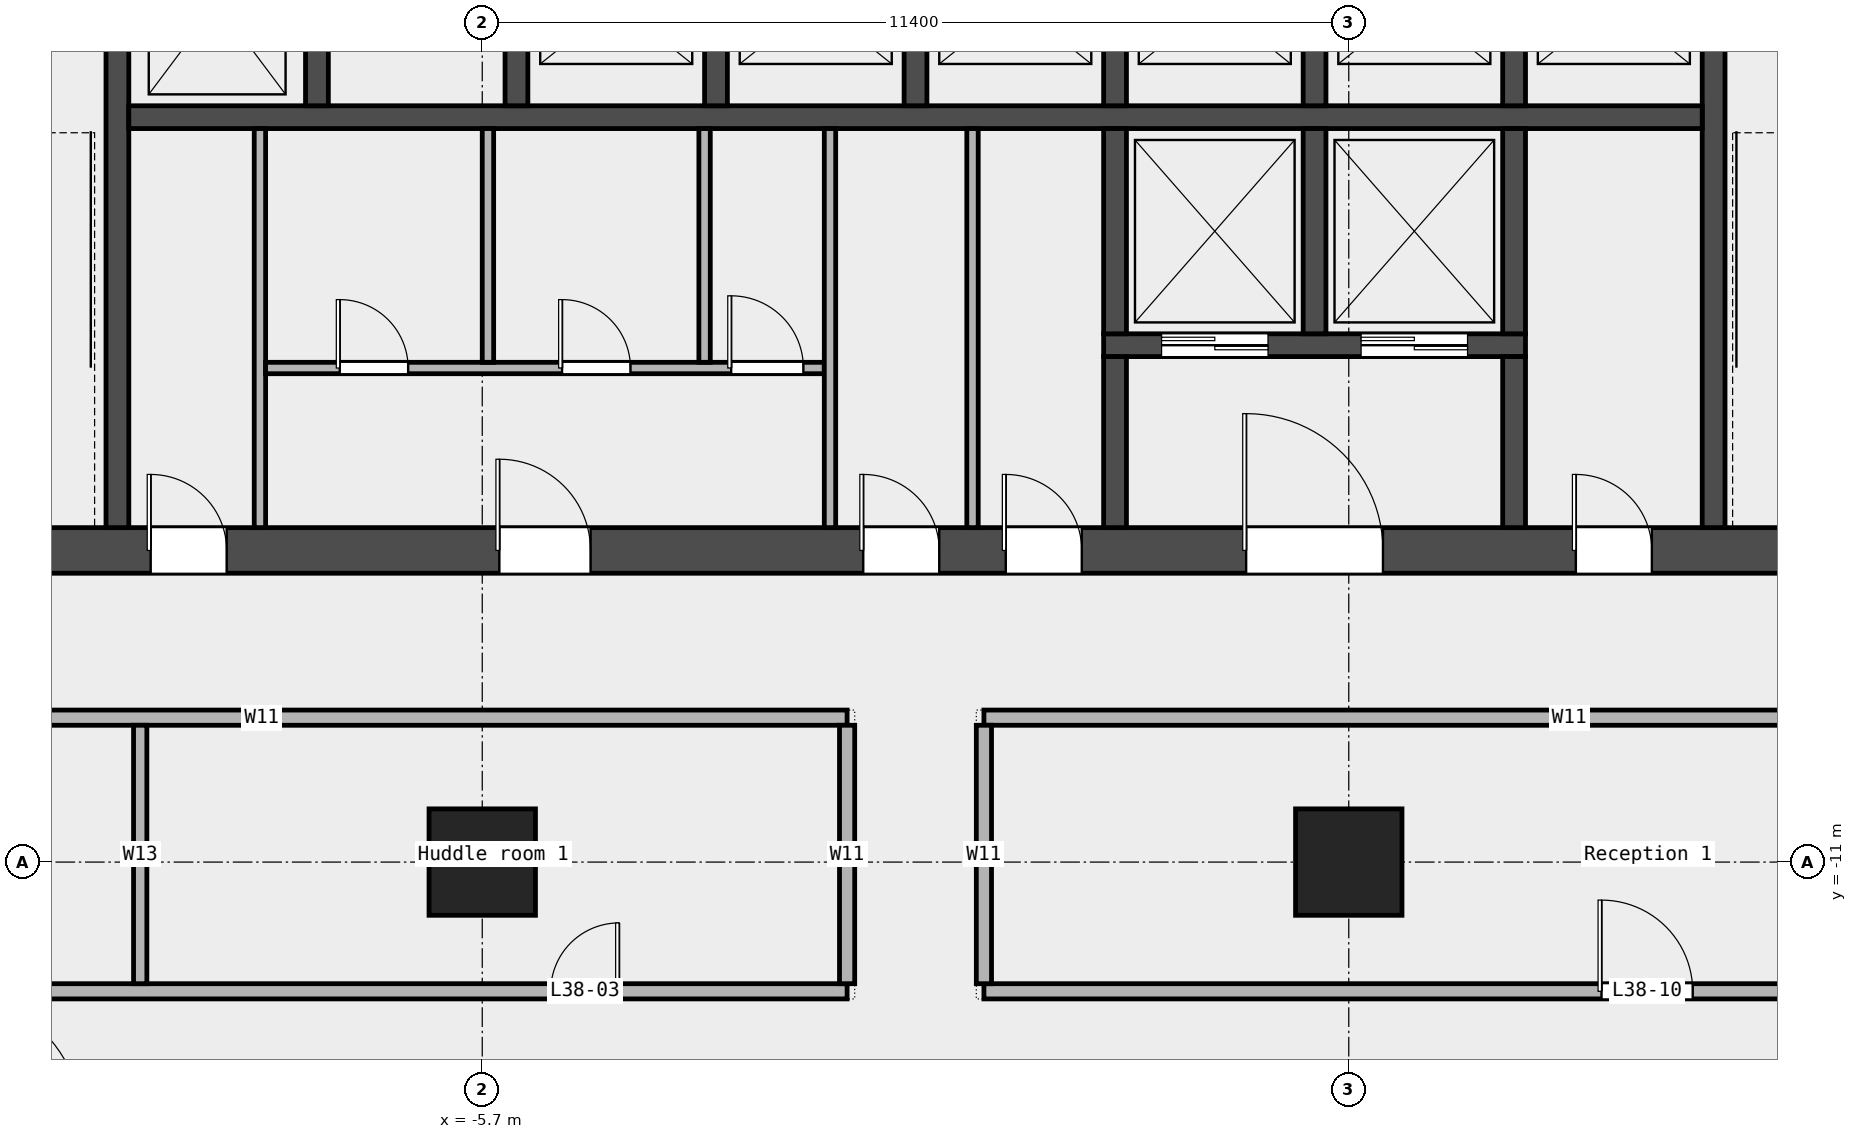
"""IFC4 building model, lengths in metres.
Left out: names, types, materials, properties, quantities, classifications, styles, units other than length and angle.
Written with IfcOpenShell. Run it as: python <this file> out.ifc"""

import sys

from ifc_helpers import new_model, si_unit, direction, frame, frame_2d, origin, origin_2d, place, context, subcontext, project, spatial, rectangle, extrude, element, fill, save


model = new_model("IFC4")
c1 = context("Model", 3, precision=1e-05, world=origin(), true_north=direction((0.0, 1.0)))
c2 = subcontext(c1, "Body", "Model", "MODEL_VIEW")
j1 = project(units=[si_unit("LENGTHUNIT", "METRE"), si_unit("PLANEANGLEUNIT", "RADIAN")], contexts=[c1])
p1 = place(None, origin())
s1 = spatial("IfcSite", under=j1, at=p1, CompositionType="ELEMENT")
p2 = place(p1, origin())
s2 = spatial("IfcBuilding", under=s1, at=p2, CompositionType="ELEMENT")
p3 = place(p2, frame((0.0, 0.0, 185.0)))
s3 = spatial("IfcBuildingStorey", under=s2, at=p3, CompositionType="ELEMENT", Elevation=185.0)
for number, where, z_axis, x_axis in (
    (1, (-5.7, -11.0, 0.0), (0.0, 0.0, 1.0), (1.0, 0.0, 0.0)),
    (2, (5.7, -11.0, 0.0), (0.0, 0.0, 1.0), (1.0, 0.0, 0.0)),
):
    element("IfcColumn", number, at=place(p3, frame(where, z_axis=z_axis, x_axis=x_axis)), inside=s3, PredefinedType="COLUMN", context=c2, shape_type="SweptSolid", body=[
        extrude(rectangle(XDim=1.4, YDim=1.4, at=origin_2d()), origin(), (0.0, 0.0, 1.0), 3.6),
    ])
p4 = place(p3, frame((-24.15, -12.7, 0.0), z_axis=(0.0, 0.0, 1.0), x_axis=(1.0, 0.0, 0.0)))
e3 = element("IfcWall", 3, at=p4, inside=s3, PredefinedType="PARTITIONING", context=c2, shape_type="SweptSolid", body=[
    extrude(rectangle(XDim=23.25, YDim=0.2, at=frame_2d((11.625, 0.0))), origin(), (0.0, 0.0, 1.0), 3.6),
])
p5 = place(p4, frame((19.35, 0.0, 0.0)))
e4 = element("IfcOpeningElement", 4, at=p5, cuts=e3, PredefinedType="OPENING", context=c2, shape_type="SweptSolid", body=[
    extrude(rectangle(XDim=0.9, YDim=2.1, at=frame_2d((0.45, 1.05))), frame((0.0, 0.112, 0.0), z_axis=(0.0, -1.0, 0.0), x_axis=(1.0, 0.0, 0.0)), (0.0, 0.0, 1.0), 0.224),
])
p6 = place(p4, frame((7.825, 0.0, 0.0)))
e5 = element("IfcOpeningElement", 5, at=p6, cuts=e3, PredefinedType="OPENING", context=c2, shape_type="SweptSolid", body=[
    extrude(rectangle(XDim=1.5, YDim=2.1, at=frame_2d((0.75, 1.05))), frame((0.0, 0.112, 0.0), z_axis=(0.0, -1.0, 0.0), x_axis=(1.0, 0.0, 0.0)), (0.0, 0.0, 1.0), 0.224),
])
p7 = place(p3, frame((0.9, -12.7, 0.0), z_axis=(0.0, 0.0, 1.0), x_axis=(1.0, 0.0, 0.0)))
e6 = element("IfcWall", 6, at=p7, inside=s3, PredefinedType="PARTITIONING", context=c2, shape_type="SweptSolid", body=[
    extrude(rectangle(XDim=25.25, YDim=0.2, at=frame_2d((12.625, 0.0))), origin(), (0.0, 0.0, 1.0), 3.6),
])
p8 = place(p7, frame((20.75, 0.0, 0.0)))
e7 = element("IfcOpeningElement", 7, at=p8, cuts=e6, PredefinedType="OPENING", context=c2, shape_type="SweptSolid", body=[
    extrude(rectangle(XDim=1.0, YDim=2.1, at=frame_2d((0.5, 1.05))), frame((0.0, 0.112, 0.0), z_axis=(0.0, -1.0, 0.0), x_axis=(1.0, 0.0, 0.0)), (0.0, 0.0, 1.0), 0.224),
])
p9 = place(p7, frame((8.125, 0.0, 0.0)))
e8 = element("IfcOpeningElement", 8, at=p9, cuts=e6, PredefinedType="OPENING", context=c2, shape_type="SweptSolid", body=[
    extrude(rectangle(XDim=1.2, YDim=2.1, at=frame_2d((0.6, 1.05))), frame((0.0, 0.112, 0.0), z_axis=(0.0, -1.0, 0.0), x_axis=(1.0, 0.0, 0.0)), (0.0, 0.0, 1.0), 0.224),
])
for number, where, z_axis, x_axis in (
    (9, (-16.3, -9.1, 0.0), (0.0, 0.0, 1.0), (1.0, 0.0, 0.0)),
    (10, (0.9, -9.1, 0.0), (0.0, 0.0, 1.0), (1.0, 0.0, 0.0)),
):
    element("IfcWall", number, at=place(p3, frame(where, z_axis=z_axis, x_axis=x_axis)), inside=s3, PredefinedType="PARTITIONING", context=c2, shape_type="SweptSolid", body=[
        extrude(rectangle(XDim=15.4, YDim=0.2, at=frame_2d((7.7, 0.0))), origin(), (0.0, 0.0, 1.0), 3.6),
    ])
p10 = place(p3, frame((-10.2, -12.6, 0.0), z_axis=(0.0, 0.0, 1.0), x_axis=(0.0, 1.0, 0.0)))
e11 = element("IfcWall", 11, at=p10, inside=s3, PredefinedType="PARTITIONING", context=c2, shape_type="SweptSolid", body=[
    extrude(rectangle(XDim=3.4, YDim=0.175, at=frame_2d((1.7, 0.0))), origin(), (0.0, 0.0, 1.0), 3.6),
])
for number, where, z_axis, x_axis in (
    (12, (-0.9, -12.6, 0.0), (0.0, 0.0, 1.0), (0.0, 1.0, 0.0)),
    (13, (0.9, -12.6, 0.0), (0.0, 0.0, 1.0), (0.0, 1.0, 0.0)),
):
    element("IfcWall", number, at=place(p3, frame(where, z_axis=z_axis, x_axis=x_axis)), inside=s3, PredefinedType="PARTITIONING", context=c2, shape_type="SweptSolid", body=[
        extrude(rectangle(XDim=3.4, YDim=0.2, at=frame_2d((1.7, 0.0))), origin(), (0.0, 0.0, 1.0), 3.6),
    ])
p11 = place(p3, frame((-14.4, -6.9, 0.0), z_axis=(0.0, 0.0, 1.0), x_axis=(1.0, 0.0, 0.0)))
e14 = element("IfcWall", 14, at=p11, inside=s3, PredefinedType="SHEAR", context=c2, shape_type="SweptSolid", body=[
    extrude(rectangle(XDim=28.8, YDim=0.6, at=frame_2d((14.4, 0.0))), origin(), (0.0, 0.0, 1.0), 3.7),
])
p12 = place(p11, frame((4.337, 0.0, 0.0)))
e15 = element("IfcOpeningElement", 15, at=p12, cuts=e14, PredefinedType="OPENING", context=c2, shape_type="SweptSolid", body=[
    extrude(rectangle(XDim=1.0, YDim=2.1, at=frame_2d((0.5, 1.05))), frame((0.0, 0.312, 0.0), z_axis=(0.0, -1.0, 0.0), x_axis=(1.0, 0.0, 0.0)), (0.0, 0.0, 1.0), 0.624),
])
p13 = place(p11, frame((8.925, 0.0, 0.0)))
e16 = element("IfcOpeningElement", 16, at=p13, cuts=e14, PredefinedType="OPENING", context=c2, shape_type="SweptSolid", body=[
    extrude(rectangle(XDim=1.2, YDim=2.1, at=frame_2d((0.6, 1.05))), frame((0.0, 0.312, 0.0), z_axis=(0.0, -1.0, 0.0), x_axis=(1.0, 0.0, 0.0)), (0.0, 0.0, 1.0), 0.624),
])
p14 = place(p11, frame((13.712, 0.0, 0.0)))
e17 = element("IfcOpeningElement", 17, at=p14, cuts=e14, PredefinedType="OPENING", context=c2, shape_type="SweptSolid", body=[
    extrude(rectangle(XDim=1.0, YDim=2.1, at=frame_2d((0.5, 1.05))), frame((0.0, 0.312, 0.0), z_axis=(0.0, -1.0, 0.0), x_axis=(1.0, 0.0, 0.0)), (0.0, 0.0, 1.0), 0.624),
])
p15 = place(p11, frame((15.587, 0.0, 0.0)))
e18 = element("IfcOpeningElement", 18, at=p15, cuts=e14, PredefinedType="OPENING", context=c2, shape_type="SweptSolid", body=[
    extrude(rectangle(XDim=1.0, YDim=2.1, at=frame_2d((0.5, 1.05))), frame((0.0, 0.312, 0.0), z_axis=(0.0, -1.0, 0.0), x_axis=(1.0, 0.0, 0.0)), (0.0, 0.0, 1.0), 0.624),
])
p16 = place(p11, frame((18.75, 0.0, 0.0)))
e19 = element("IfcOpeningElement", 19, at=p16, cuts=e14, PredefinedType="OPENING", context=c2, shape_type="SweptSolid", body=[
    extrude(rectangle(XDim=1.8, YDim=2.1, at=frame_2d((0.9, 1.05))), frame((0.0, 0.312, 0.0), z_axis=(0.0, -1.0, 0.0), x_axis=(1.0, 0.0, 0.0)), (0.0, 0.0, 1.0), 0.624),
])
p17 = place(p11, frame((23.087, 0.0, 0.0)))
e20 = element("IfcOpeningElement", 20, at=p17, cuts=e14, PredefinedType="OPENING", context=c2, shape_type="SweptSolid", body=[
    extrude(rectangle(XDim=1.0, YDim=2.1, at=frame_2d((0.5, 1.05))), frame((0.0, 0.312, 0.0), z_axis=(0.0, -1.0, 0.0), x_axis=(1.0, 0.0, 0.0)), (0.0, 0.0, 1.0), 0.624),
])
for number, where, z_axis, x_axis in (
    (21, (-10.5, -6.6, 0.0), (0.0, 0.0, 1.0), (0.0, 1.0, 0.0)),
    (22, (10.5, -6.6, 0.0), (0.0, 0.0, 1.0), (0.0, 1.0, 0.0)),
):
    element("IfcWall", number, at=place(p3, frame(where, z_axis=z_axis, x_axis=x_axis)), inside=s3, PredefinedType="SHEAR", context=c2, shape_type="SweptSolid", body=[
        extrude(rectangle(XDim=8.55, YDim=0.3, at=frame_2d((4.275, 0.0))), origin(), (0.0, 0.0, 1.0), 3.7),
    ])
p18 = place(p3, frame((-10.35, -1.2, 0.0), z_axis=(0.0, 0.0, 1.0), x_axis=(1.0, 0.0, 0.0)))
e23 = element("IfcWall", 23, at=p18, inside=s3, PredefinedType="SOLIDWALL", context=c2, shape_type="SweptSolid", body=[
    extrude(rectangle(XDim=20.7, YDim=0.3, at=frame_2d((10.35, 0.0))), origin(), (0.0, 0.0, 1.0), 3.7),
])
for number, where, z_axis, x_axis in (
    (24, (-7.875, -1.05, 0.0), (0.0, 0.0, 1.0), (0.0, 1.0, 0.0)),
    (25, (-5.25, -1.05, 0.0), (0.0, 0.0, 1.0), (0.0, 1.0, 0.0)),
    (26, (-2.625, -1.05, 0.0), (0.0, 0.0, 1.0), (0.0, 1.0, 0.0)),
    (27, (0.0, -1.05, 0.0), (0.0, 0.0, 1.0), (0.0, 1.0, 0.0)),
    (28, (2.625, -1.05, 0.0), (0.0, 0.0, 1.0), (0.0, 1.0, 0.0)),
    (29, (5.25, -1.05, 0.0), (0.0, 0.0, 1.0), (0.0, 1.0, 0.0)),
    (30, (7.875, -1.05, 0.0), (0.0, 0.0, 1.0), (0.0, 1.0, 0.0)),
):
    element("IfcWall", number, at=place(p3, frame(where, z_axis=z_axis, x_axis=x_axis)), inside=s3, PredefinedType="SOLIDWALL", context=c2, shape_type="SweptSolid", body=[
        extrude(rectangle(XDim=2.7, YDim=0.3, at=frame_2d((1.35, 0.0))), origin(), (0.0, 0.0, 1.0), 3.7),
    ])
p19 = place(p3, frame((2.475, -4.2, 0.0), z_axis=(0.0, 0.0, 1.0), x_axis=(1.0, 0.0, 0.0)))
e31 = element("IfcWall", 31, at=p19, inside=s3, PredefinedType="SOLIDWALL", context=c2, shape_type="SweptSolid", body=[
    extrude(rectangle(XDim=5.55, YDim=0.3, at=frame_2d((2.775, 0.0))), origin(), (0.0, 0.0, 1.0), 3.7),
])
p20 = place(p19, frame((0.762, 0.0, 0.0)))
e32 = element("IfcOpeningElement", 32, at=p20, cuts=e31, PredefinedType="OPENING", context=c2, shape_type="SweptSolid", body=[
    extrude(rectangle(XDim=1.4, YDim=2.1, at=frame_2d((0.7, 1.05))), frame((0.0, 0.162, 0.0), z_axis=(0.0, -1.0, 0.0), x_axis=(1.0, 0.0, 0.0)), (0.0, 0.0, 1.0), 0.324),
])
p21 = place(p19, frame((3.387, 0.0, 0.0)))
e33 = element("IfcOpeningElement", 33, at=p21, cuts=e31, PredefinedType="OPENING", context=c2, shape_type="SweptSolid", body=[
    extrude(rectangle(XDim=1.4, YDim=2.1, at=frame_2d((0.7, 1.05))), frame((0.0, 0.162, 0.0), z_axis=(0.0, -1.0, 0.0), x_axis=(1.0, 0.0, 0.0)), (0.0, 0.0, 1.0), 0.324),
])
p22 = place(p3, frame((2.625, -4.05, 0.0), z_axis=(0.0, 0.0, 1.0), x_axis=(0.0, 1.0, 0.0)))
e34 = element("IfcWall", 34, at=p22, inside=s3, PredefinedType="SOLIDWALL", context=c2, shape_type="SweptSolid", body=[
    extrude(rectangle(XDim=2.7, YDim=0.3, at=frame_2d((1.35, 0.0))), origin(), (0.0, 0.0, 1.0), 3.7),
])
p23 = place(p3, frame((2.625, -6.6, 0.0), z_axis=(0.0, 0.0, 1.0), x_axis=(0.0, 1.0, 0.0)))
e35 = element("IfcWall", 35, at=p23, inside=s3, PredefinedType="SOLIDWALL", context=c2, shape_type="SweptSolid", body=[
    extrude(rectangle(XDim=2.25, YDim=0.3, at=frame_2d((1.125, 0.0))), origin(), (0.0, 0.0, 1.0), 3.7),
])
for number, where, z_axis, x_axis in (
    (36, (5.25, -4.05, 0.0), (0.0, 0.0, 1.0), (0.0, 1.0, 0.0)),
    (37, (7.875, -4.05, 0.0), (0.0, 0.0, 1.0), (0.0, 1.0, 0.0)),
):
    element("IfcWall", number, at=place(p3, frame(where, z_axis=z_axis, x_axis=x_axis)), inside=s3, PredefinedType="SOLIDWALL", context=c2, shape_type="SweptSolid", body=[
        extrude(rectangle(XDim=2.7, YDim=0.3, at=frame_2d((1.35, 0.0))), origin(), (0.0, 0.0, 1.0), 3.7),
    ])
p24 = place(p3, frame((7.875, -6.6, 0.0), z_axis=(0.0, 0.0, 1.0), x_axis=(0.0, 1.0, 0.0)))
e38 = element("IfcWall", 38, at=p24, inside=s3, PredefinedType="SOLIDWALL", context=c2, shape_type="SweptSolid", body=[
    extrude(rectangle(XDim=2.25, YDim=0.3, at=frame_2d((1.125, 0.0))), origin(), (0.0, 0.0, 1.0), 3.7),
])
p25 = place(p3, frame((-8.625, -6.6, 0.0), z_axis=(0.0, 0.0, 1.0), x_axis=(0.0, 1.0, 0.0)))
e39 = element("IfcWall", 39, at=p25, inside=s3, PredefinedType="PARTITIONING", context=c2, shape_type="SweptSolid", body=[
    extrude(rectangle(XDim=5.25, YDim=0.15, at=frame_2d((2.625, 0.0))), origin(), (0.0, 0.0, 1.0), 3.7),
])
p26 = place(p3, frame((-8.55, -4.5, 0.0), z_axis=(0.0, 0.0, 1.0), x_axis=(1.0, 0.0, 0.0)))
e40 = element("IfcWall", 40, at=p26, inside=s3, PredefinedType="PARTITIONING", context=c2, shape_type="SweptSolid", body=[
    extrude(rectangle(XDim=7.35, YDim=0.15, at=frame_2d((3.675, 0.0))), origin(), (0.0, 0.0, 1.0), 3.7),
])
p27 = place(p26, frame((0.975, 0.0, 0.0)))
e41 = element("IfcOpeningElement", 41, at=p27, cuts=e40, PredefinedType="OPENING", context=c2, shape_type="SweptSolid", body=[
    extrude(rectangle(XDim=0.9, YDim=2.1, at=frame_2d((0.45, 1.05))), frame((0.0, 0.087, 0.0), z_axis=(0.0, -1.0, 0.0), x_axis=(1.0, 0.0, 0.0)), (0.0, 0.0, 1.0), 0.174),
])
p28 = place(p26, frame((3.9, 0.0, 0.0)))
e42 = element("IfcOpeningElement", 42, at=p28, cuts=e40, PredefinedType="OPENING", context=c2, shape_type="SweptSolid", body=[
    extrude(rectangle(XDim=0.9, YDim=2.1, at=frame_2d((0.45, 1.05))), frame((0.0, 0.087, 0.0), z_axis=(0.0, -1.0, 0.0), x_axis=(1.0, 0.0, 0.0)), (0.0, 0.0, 1.0), 0.174),
])
p29 = place(p26, frame((6.125, 0.0, 0.0)))
e43 = element("IfcOpeningElement", 43, at=p29, cuts=e40, PredefinedType="OPENING", context=c2, shape_type="SweptSolid", body=[
    extrude(rectangle(XDim=0.95, YDim=2.1, at=frame_2d((0.475, 1.05))), frame((0.0, 0.087, 0.0), z_axis=(0.0, -1.0, 0.0), x_axis=(1.0, 0.0, 0.0)), (0.0, 0.0, 1.0), 0.174),
])
for number, where, z_axis, x_axis in (
    (44, (-5.625, -4.425, 0.0), (0.0, 0.0, 1.0), (0.0, 1.0, 0.0)),
    (45, (-2.775, -4.425, 0.0), (0.0, 0.0, 1.0), (0.0, 1.0, 0.0)),
):
    element("IfcWall", number, at=place(p3, frame(where, z_axis=z_axis, x_axis=x_axis)), inside=s3, PredefinedType="PARTITIONING", context=c2, shape_type="SweptSolid", body=[
        extrude(rectangle(XDim=3.075, YDim=0.15, at=frame_2d((1.538, 0.0))), origin(), (0.0, 0.0, 1.0), 3.7),
    ])
for number, where, z_axis, x_axis in (
    (46, (-1.125, -6.6, 0.0), (0.0, 0.0, 1.0), (0.0, 1.0, 0.0)),
    (47, (0.75, -6.6, 0.0), (0.0, 0.0, 1.0), (0.0, 1.0, 0.0)),
):
    element("IfcWall", number, at=place(p3, frame(where, z_axis=z_axis, x_axis=x_axis)), inside=s3, PredefinedType="PARTITIONING", context=c2, shape_type="SweptSolid", body=[
        extrude(rectangle(XDim=5.25, YDim=0.15, at=frame_2d((2.625, 0.0))), origin(), (0.0, 0.0, 1.0), 3.7),
    ])
p30 = place(p5, origin())
e48 = element("IfcDoor", 48, at=p30, inside=s3, OperationType="SINGLE_SWING_RIGHT", PredefinedType="DOOR", context=c2, shape_type="SweptSolid", body=[
    extrude(rectangle(XDim=0.9, YDim=2.1, at=frame_2d((0.45, 1.05))), frame((0.0, 0.025, 0.0), z_axis=(0.0, -1.0, 0.0), x_axis=(1.0, 0.0, 0.0)), (0.0, 0.0, 1.0), 0.05),
])
fill(e4, e48)
p31 = place(p9, origin())
e49 = element("IfcDoor", 49, at=p31, inside=s3, OperationType="SINGLE_SWING_LEFT", PredefinedType="DOOR", context=c2, shape_type="SweptSolid", body=[
    extrude(rectangle(XDim=1.2, YDim=2.1, at=frame_2d((0.6, 1.05))), frame((0.0, 0.025, 0.0), z_axis=(0.0, -1.0, 0.0), x_axis=(1.0, 0.0, 0.0)), (0.0, 0.0, 1.0), 0.05),
])
fill(e8, e49)
p32 = place(p20, origin())
e50 = element("IfcDoor", 50, at=p32, inside=s3, OperationType="DOUBLE_DOOR_SLIDING", PredefinedType="DOOR", context=c2, shape_type="SweptSolid", body=[
    extrude(rectangle(XDim=1.4, YDim=2.1, at=frame_2d((0.7, 1.05))), frame((0.0, 0.025, 0.0), z_axis=(0.0, -1.0, 0.0), x_axis=(1.0, 0.0, 0.0)), (0.0, 0.0, 1.0), 0.05),
])
fill(e32, e50)
p33 = place(p21, origin())
e51 = element("IfcDoor", 51, at=p33, inside=s3, OperationType="DOUBLE_DOOR_SLIDING", PredefinedType="DOOR", context=c2, shape_type="SweptSolid", body=[
    extrude(rectangle(XDim=1.4, YDim=2.1, at=frame_2d((0.7, 1.05))), frame((0.0, 0.025, 0.0), z_axis=(0.0, -1.0, 0.0), x_axis=(1.0, 0.0, 0.0)), (0.0, 0.0, 1.0), 0.05),
])
fill(e33, e51)
p34 = place(p12, origin())
e52 = element("IfcDoor", 52, at=p34, inside=s3, OperationType="SINGLE_SWING_LEFT", PredefinedType="DOOR", context=c2, shape_type="SweptSolid", body=[
    extrude(rectangle(XDim=1.0, YDim=2.1, at=frame_2d((0.5, 1.05))), frame((0.0, 0.025, 0.0), z_axis=(0.0, -1.0, 0.0), x_axis=(1.0, 0.0, 0.0)), (0.0, 0.0, 1.0), 0.05),
])
fill(e15, e52)
p35 = place(p13, origin())
e53 = element("IfcDoor", 53, at=p35, inside=s3, OperationType="SINGLE_SWING_LEFT", PredefinedType="DOOR", context=c2, shape_type="SweptSolid", body=[
    extrude(rectangle(XDim=1.2, YDim=2.1, at=frame_2d((0.6, 1.05))), frame((0.0, 0.025, 0.0), z_axis=(0.0, -1.0, 0.0), x_axis=(1.0, 0.0, 0.0)), (0.0, 0.0, 1.0), 0.05),
])
fill(e16, e53)
p36 = place(p27, origin())
e54 = element("IfcDoor", 54, at=p36, inside=s3, OperationType="SINGLE_SWING_LEFT", PredefinedType="DOOR", context=c2, shape_type="SweptSolid", body=[
    extrude(rectangle(XDim=0.9, YDim=2.1, at=frame_2d((0.45, 1.05))), frame((0.0, 0.025, 0.0), z_axis=(0.0, -1.0, 0.0), x_axis=(1.0, 0.0, 0.0)), (0.0, 0.0, 1.0), 0.05),
])
fill(e41, e54)
p37 = place(p28, origin())
e55 = element("IfcDoor", 55, at=p37, inside=s3, OperationType="SINGLE_SWING_LEFT", PredefinedType="DOOR", context=c2, shape_type="SweptSolid", body=[
    extrude(rectangle(XDim=0.9, YDim=2.1, at=frame_2d((0.45, 1.05))), frame((0.0, 0.025, 0.0), z_axis=(0.0, -1.0, 0.0), x_axis=(1.0, 0.0, 0.0)), (0.0, 0.0, 1.0), 0.05),
])
fill(e42, e55)
p38 = place(p29, origin())
e56 = element("IfcDoor", 56, at=p38, inside=s3, OperationType="SINGLE_SWING_LEFT", PredefinedType="DOOR", context=c2, shape_type="SweptSolid", body=[
    extrude(rectangle(XDim=0.95, YDim=2.1, at=frame_2d((0.475, 1.05))), frame((0.0, 0.025, 0.0), z_axis=(0.0, -1.0, 0.0), x_axis=(1.0, 0.0, 0.0)), (0.0, 0.0, 1.0), 0.05),
])
fill(e43, e56)
p39 = place(p14, origin())
e57 = element("IfcDoor", 57, at=p39, inside=s3, OperationType="SINGLE_SWING_LEFT", PredefinedType="DOOR", context=c2, shape_type="SweptSolid", body=[
    extrude(rectangle(XDim=1.0, YDim=2.1, at=frame_2d((0.5, 1.05))), frame((0.0, 0.025, 0.0), z_axis=(0.0, -1.0, 0.0), x_axis=(1.0, 0.0, 0.0)), (0.0, 0.0, 1.0), 0.05),
])
fill(e17, e57)
p40 = place(p15, origin())
e58 = element("IfcDoor", 58, at=p40, inside=s3, OperationType="SINGLE_SWING_LEFT", PredefinedType="DOOR", context=c2, shape_type="SweptSolid", body=[
    extrude(rectangle(XDim=1.0, YDim=2.1, at=frame_2d((0.5, 1.05))), frame((0.0, 0.025, 0.0), z_axis=(0.0, -1.0, 0.0), x_axis=(1.0, 0.0, 0.0)), (0.0, 0.0, 1.0), 0.05),
])
fill(e18, e58)
p41 = place(p16, origin())
e59 = element("IfcDoor", 59, at=p41, inside=s3, OperationType="DOUBLE_DOOR_SINGLE_SWING", PredefinedType="DOOR", context=c2, shape_type="SweptSolid", body=[
    extrude(rectangle(XDim=1.8, YDim=2.1, at=frame_2d((0.9, 1.05))), frame((0.0, 0.025, 0.0), z_axis=(0.0, -1.0, 0.0), x_axis=(1.0, 0.0, 0.0)), (0.0, 0.0, 1.0), 0.05),
])
fill(e19, e59)
p42 = place(p17, origin())
e60 = element("IfcDoor", 60, at=p42, inside=s3, OperationType="SINGLE_SWING_LEFT", PredefinedType="DOOR", context=c2, shape_type="SweptSolid", body=[
    extrude(rectangle(XDim=1.0, YDim=2.1, at=frame_2d((0.5, 1.05))), frame((0.0, 0.025, 0.0), z_axis=(0.0, -1.0, 0.0), x_axis=(1.0, 0.0, 0.0)), (0.0, 0.0, 1.0), 0.05),
])
fill(e20, e60)
save(model, sys.argv[1])
